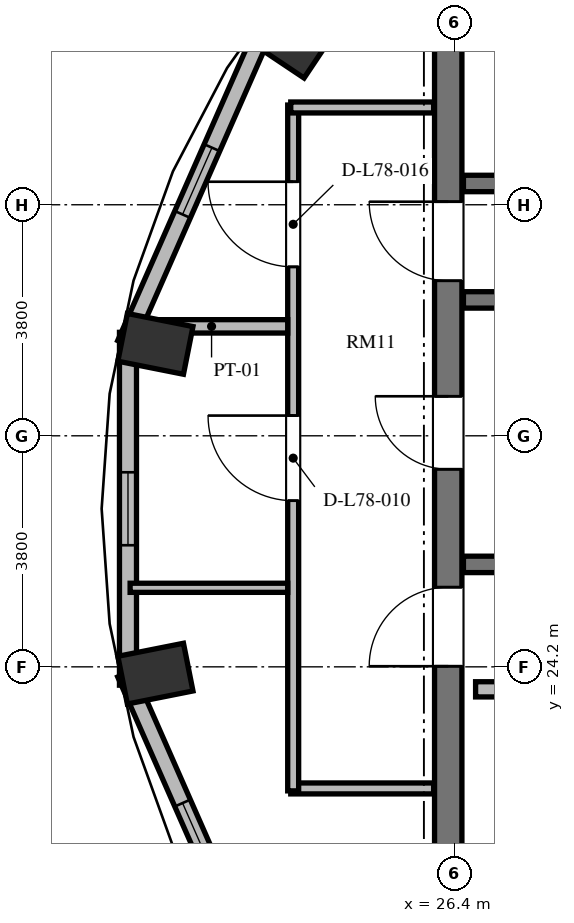
"""IFC4 building model, lengths in metres.
Left out: names, types, materials, properties, quantities, classifications, styles, units other than length and angle.
Written with IfcOpenShell. Run it as: python <this file> out.ifc"""

import sys

from ifc_helpers import new_model, si_unit, direction, frame, frame_2d, origin, origin_2d, place, context, subcontext, project, spatial, rectangle, extrude, element, fill, save


model = new_model("IFC4")
c1 = context("Model", 3, precision=1e-05, world=origin(), true_north=direction((0.0, 1.0)))
c2 = subcontext(c1, "Body", "Model", "MODEL_VIEW")
j1 = project(units=[si_unit("LENGTHUNIT", "METRE"), si_unit("PLANEANGLEUNIT", "RADIAN")], contexts=[c1])
p1 = place(None, origin())
s1 = spatial("IfcSite", under=j1, at=p1, CompositionType="ELEMENT")
p2 = place(p1, origin())
s2 = spatial("IfcBuilding", under=s1, at=p2, CompositionType="ELEMENT")
p3 = place(p2, frame((0.0, 0.0, 298.8)))
s3 = spatial("IfcBuildingStorey", under=s2, at=p3, CompositionType="ELEMENT", Elevation=298.8)
for number, where, z_axis, x_axis in (
    (1, (23.694, 34.522, 0.0), (0.0, 0.0, 1.0), (-0.831, 0.556, 0.0)),
    (2, (21.484, 29.512, 0.0), (0.0, 0.0, 1.0), (-0.981, 0.195, 0.0)),
    (3, (21.484, 24.088, 0.0), (0.0, 0.0, 1.0), (-0.981, -0.195, 0.0)),
):
    element("IfcColumn", number, at=place(p3, frame(where, z_axis=z_axis, x_axis=x_axis)), inside=s3, PredefinedType="COLUMN", context=c2, shape_type="SweptSolid", body=[
        extrude(rectangle(XDim=1.1, YDim=0.8, at=origin_2d()), origin(), (0.0, 0.0, 1.0), 3.648),
    ])
p4 = place(p3, frame((26.3, 20.95, 0.0), z_axis=(0.0, 0.0, 1.0), x_axis=(0.0, 1.0, 0.0)))
e4 = element("IfcWall", 4, at=p4, inside=s3, PredefinedType="SHEAR", context=c2, shape_type="SweptSolid", body=[
    extrude(rectangle(XDim=14.1, YDim=0.45, at=frame_2d((7.05, 0.0))), origin(), (0.0, 0.0, 1.0), 3.648),
])
p5 = place(p4, frame((6.5, 0.0, 0.0)))
e5 = element("IfcOpeningElement", 5, at=p5, cuts=e4, PredefinedType="OPENING", context=c2, shape_type="SweptSolid", body=[
    extrude(rectangle(XDim=1.2, YDim=2.15, at=frame_2d((0.6, 1.075))), frame((0.0, 0.235, 0.0), z_axis=(0.0, -1.0, 0.0), x_axis=(1.0, 0.0, 0.0)), (0.0, 0.0, 1.0), 0.47),
])
p6 = place(p4, frame((9.6, 0.0, 0.0)))
e6 = element("IfcOpeningElement", 6, at=p6, cuts=e4, PredefinedType="OPENING", context=c2, shape_type="SweptSolid", body=[
    extrude(rectangle(XDim=1.3, YDim=2.2, at=frame_2d((0.65, 1.1))), frame((0.0, 0.235, 0.0), z_axis=(0.0, -1.0, 0.0), x_axis=(1.0, 0.0, 0.0)), (0.0, 0.0, 1.0), 0.47),
])
p7 = place(p4, frame((3.26, 0.0, 0.0)))
e7 = element("IfcOpeningElement", 7, at=p7, cuts=e4, PredefinedType="OPENING", context=c2, shape_type="SweptSolid", body=[
    extrude(rectangle(XDim=1.3, YDim=2.2, at=frame_2d((0.65, 1.1))), frame((0.0, 0.235, 0.0), z_axis=(0.0, -1.0, 0.0), x_axis=(1.0, 0.0, 0.0)), (0.0, 0.0, 1.0), 0.47),
])
p8 = place(p3, frame((23.352, 34.869, 0.0), z_axis=(0.0, 0.0, 1.0), x_axis=(-0.402882523888, -0.915251698685, 0.0)))
e8 = element("IfcWall", 8, at=p8, inside=s3, PredefinedType="SOLIDWALL", context=c2, shape_type="SweptSolid", body=[
    extrude(rectangle(XDim=5.856, YDim=0.28, at=frame_2d((2.928, 0.0))), origin(), (0.0, 0.0, 1.0), 3.328),
])
p9 = place(p8, frame((2.328, 0.0, 0.85)))
e9 = element("IfcOpeningElement", 9, at=p9, cuts=e8, PredefinedType="OPENING", context=c2, shape_type="SweptSolid", body=[
    extrude(rectangle(XDim=1.2, YDim=1.8, at=frame_2d((0.6, 0.9))), frame((0.0, 0.15, 0.0), z_axis=(0.0, -1.0, 0.0), x_axis=(1.0, 0.0, 0.0)), (0.0, 0.0, 1.0), 0.3),
])
p10 = place(p3, frame((21.033, 29.701, 0.0), z_axis=(0.0, 0.0, 1.0), x_axis=(0.0, -1.0, 0.0)))
e10 = element("IfcWall", 10, at=p10, inside=s3, PredefinedType="SOLIDWALL", context=c2, shape_type="SweptSolid", body=[
    extrude(rectangle(XDim=5.803, YDim=0.28, at=frame_2d((2.901, 0.0))), origin(), (0.0, 0.0, 1.0), 3.328),
])
p11 = place(p10, frame((2.302, 0.0, 0.85)))
e11 = element("IfcOpeningElement", 11, at=p11, cuts=e10, PredefinedType="OPENING", context=c2, shape_type="SweptSolid", body=[
    extrude(rectangle(XDim=1.2, YDim=1.8, at=frame_2d((0.6, 0.9))), frame((0.0, 0.15, 0.0), z_axis=(0.0, -1.0, 0.0), x_axis=(1.0, 0.0, 0.0)), (0.0, 0.0, 1.0), 0.3),
])
p12 = place(p3, frame((20.993, 24.09, 0.0), z_axis=(0.0, 0.0, 1.0), x_axis=(0.402867150469, -0.91525846572, 0.0)))
e12 = element("IfcWall", 12, at=p12, inside=s3, PredefinedType="SOLIDWALL", context=c2, shape_type="SweptSolid", body=[
    extrude(rectangle(XDim=5.856, YDim=0.28, at=frame_2d((2.928, 0.0))), origin(), (0.0, 0.0, 1.0), 3.328),
])
p13 = place(p12, frame((2.328, 0.0, 0.85)))
e13 = element("IfcOpeningElement", 13, at=p13, cuts=e12, PredefinedType="OPENING", context=c2, shape_type="SweptSolid", body=[
    extrude(rectangle(XDim=1.2, YDim=1.8, at=frame_2d((0.6, 0.9))), frame((0.0, 0.15, 0.0), z_axis=(0.0, -1.0, 0.0), x_axis=(1.0, 0.0, 0.0)), (0.0, 0.0, 1.0), 0.3),
])
for number, where, z_axis, x_axis in (
    (14, (26.55, 30.235, 0.0), (0.0, 0.0, 1.0), (1.0, 0.0, 0.0)),
    (15, (26.55, 25.885, 0.0), (0.0, 0.0, 1.0), (1.0, 0.0, 0.0)),
):
    element("IfcWall", number, at=place(p3, frame(where, z_axis=z_axis, x_axis=x_axis)), inside=s3, PredefinedType="SHEAR", context=c2, shape_type="SweptSolid", body=[
        extrude(rectangle(XDim=7.985, YDim=0.27, at=frame_2d((3.992, 0.0))), origin(), (0.0, 0.0, 1.0), 3.648),
    ])
p14 = place(p3, frame((26.55, 32.15, 0.0), z_axis=(0.0, 0.0, 1.0), x_axis=(1.0, 0.0, 0.0)))
e16 = element("IfcWall", 16, at=p14, inside=s3, PredefinedType="SHEAR", context=c2, shape_type="SweptSolid", body=[
    extrude(rectangle(XDim=16.4, YDim=0.27, at=frame_2d((8.2, 0.0))), origin(), (0.0, 0.0, 1.0), 3.648),
])
p15 = place(p14, frame((2.175, 0.0, 0.0)))
e17 = element("IfcOpeningElement", 17, at=p15, cuts=e16, PredefinedType="OPENING", context=c2, shape_type="SweptSolid", body=[
    extrude(rectangle(XDim=1.05, YDim=2.15, at=frame_2d((0.525, 1.075))), frame((0.0, 0.145, 0.0), z_axis=(0.0, -1.0, 0.0), x_axis=(1.0, 0.0, 0.0)), (0.0, 0.0, 1.0), 0.29),
])
p16 = place(p14, frame((7.575, 0.0, 0.0)))
e18 = element("IfcOpeningElement", 18, at=p16, cuts=e16, PredefinedType="OPENING", context=c2, shape_type="SweptSolid", body=[
    extrude(rectangle(XDim=1.05, YDim=2.15, at=frame_2d((0.525, 1.075))), frame((0.0, 0.145, 0.0), z_axis=(0.0, -1.0, 0.0), x_axis=(1.0, 0.0, 0.0)), (0.0, 0.0, 1.0), 0.29),
])
p17 = place(p14, frame((11.9, 0.0, 0.0)))
e19 = element("IfcOpeningElement", 19, at=p17, cuts=e16, PredefinedType="OPENING", context=c2, shape_type="SweptSolid", body=[
    extrude(rectangle(XDim=1.1, YDim=2.2, at=frame_2d((0.55, 1.1))), frame((0.0, 0.145, 0.0), z_axis=(0.0, -1.0, 0.0), x_axis=(1.0, 0.0, 0.0)), (0.0, 0.0, 1.0), 0.29),
])
p18 = place(p14, frame((14.5, 0.0, 0.0)))
e20 = element("IfcOpeningElement", 20, at=p18, cuts=e16, PredefinedType="OPENING", context=c2, shape_type="SweptSolid", body=[
    extrude(rectangle(XDim=1.1, YDim=2.2, at=frame_2d((0.55, 1.1))), frame((0.0, 0.145, 0.0), z_axis=(0.0, -1.0, 0.0), x_axis=(1.0, 0.0, 0.0)), (0.0, 0.0, 1.0), 0.29),
])
p19 = place(p3, frame((26.75, 23.83, 0.0), z_axis=(0.0, 0.0, 1.0), x_axis=(1.0, 0.0, 0.0)))
e21 = element("IfcWall", 21, at=p19, inside=s3, PredefinedType="SOLIDWALL", context=c2, shape_type="SweptSolid", body=[
    extrude(rectangle(XDim=16.2, YDim=0.25, at=frame_2d((8.1, 0.0))), origin(), (0.0, 0.0, 1.0), 3.328),
])
p20 = place(p19, frame((4.75, 0.0, 0.0)))
e22 = element("IfcOpeningElement", 22, at=p20, cuts=e21, PredefinedType="OPENING", context=c2, shape_type="SweptSolid", body=[
    extrude(rectangle(XDim=1.4, YDim=2.2, at=frame_2d((0.7, 1.1))), frame((0.0, 0.135, 0.0), z_axis=(0.0, -1.0, 0.0), x_axis=(1.0, 0.0, 0.0)), (0.0, 0.0, 1.0), 0.27),
])
p21 = place(p19, frame((11.7, 0.0, 0.0)))
e23 = element("IfcOpeningElement", 23, at=p21, cuts=e21, PredefinedType="OPENING", context=c2, shape_type="SweptSolid", body=[
    extrude(rectangle(XDim=1.1, YDim=2.2, at=frame_2d((0.55, 1.1))), frame((0.0, 0.135, 0.0), z_axis=(0.0, -1.0, 0.0), x_axis=(1.0, 0.0, 0.0)), (0.0, 0.0, 1.0), 0.27),
])
p22 = place(p19, frame((14.15, 0.0, 0.0)))
e24 = element("IfcOpeningElement", 24, at=p22, cuts=e21, PredefinedType="OPENING", context=c2, shape_type="SweptSolid", body=[
    extrude(rectangle(XDim=1.4, YDim=2.3, at=frame_2d((0.7, 1.15))), frame((0.0, 0.135, 0.0), z_axis=(0.0, -1.0, 0.0), x_axis=(1.0, 0.0, 0.0)), (0.0, 0.0, 1.0), 0.27),
])
p23 = place(p3, frame((26.06, 22.2, 0.0), z_axis=(0.0, 0.0, 1.0), x_axis=(-1.0, 0.0, 0.0)))
e25 = element("IfcWall", 25, at=p23, inside=s3, PredefinedType="PARTITIONING", context=c2, shape_type="SweptSolid", body=[
    extrude(rectangle(XDim=2.35, YDim=0.18, at=frame_2d((1.175, 0.0))), origin(), (0.0, 0.0, 1.0), 3.328),
])
p24 = place(p3, frame((23.75, 22.16, 0.0), z_axis=(0.0, 0.0, 1.0), x_axis=(0.0, 1.0, 0.0)))
e26 = element("IfcWall", 26, at=p24, inside=s3, PredefinedType="PARTITIONING", context=c2, shape_type="SweptSolid", body=[
    extrude(rectangle(XDim=11.28, YDim=0.18, at=frame_2d((5.64, 0.0))), origin(), (0.0, 0.0, 1.0), 2.953),
])
p25 = place(p24, frame((4.772, 0.0, 0.0)))
e27 = element("IfcOpeningElement", 27, at=p25, cuts=e26, PredefinedType="OPENING", context=c2, shape_type="SweptSolid", body=[
    extrude(rectangle(XDim=1.4, YDim=2.2, at=frame_2d((0.7, 1.1))), frame((0.0, 0.1, 0.0), z_axis=(0.0, -1.0, 0.0), x_axis=(1.0, 0.0, 0.0)), (0.0, 0.0, 1.0), 0.2),
])
p26 = place(p24, frame((8.618, 0.0, 0.0)))
e28 = element("IfcOpeningElement", 28, at=p26, cuts=e26, PredefinedType="OPENING", context=c2, shape_type="SweptSolid", body=[
    extrude(rectangle(XDim=1.4, YDim=2.2, at=frame_2d((0.7, 1.1))), frame((0.0, 0.1, 0.0), z_axis=(0.0, -1.0, 0.0), x_axis=(1.0, 0.0, 0.0)), (0.0, 0.0, 1.0), 0.2),
])
p27 = place(p3, frame((23.71, 33.4, 0.0), z_axis=(0.0, 0.0, 1.0), x_axis=(1.0, 0.0, 0.0)))
e29 = element("IfcWall", 29, at=p27, inside=s3, PredefinedType="PARTITIONING", context=c2, shape_type="SweptSolid", body=[
    extrude(rectangle(XDim=2.35, YDim=0.18, at=frame_2d((1.175, 0.0))), origin(), (0.0, 0.0, 1.0), 3.328),
])
p28 = place(p3, frame((21.068, 25.5, 0.0), z_axis=(0.0, 0.0, 1.0), x_axis=(1.0, 0.0, 0.0)))
e30 = element("IfcWall", 30, at=p28, inside=s3, PredefinedType="PARTITIONING", context=c2, shape_type="SweptSolid", body=[
    extrude(rectangle(XDim=2.592, YDim=0.15, at=frame_2d((1.296, 0.0))), origin(), (0.0, 0.0, 1.0), 3.328),
])
p29 = place(p3, frame((21.156, 29.8, 0.0), z_axis=(0.0, 0.0, 1.0), x_axis=(1.0, 0.0, 0.0)))
e31 = element("IfcWall", 31, at=p29, inside=s3, PredefinedType="PARTITIONING", context=c2, shape_type="SweptSolid", body=[
    extrude(rectangle(XDim=2.504, YDim=0.22, at=frame_2d((1.252, 0.0))), origin(), (0.0, 0.0, 1.0), 3.328),
])
p30 = place(p9, origin())
e32 = element("IfcWindow", 32, at=p30, inside=s3, PartitioningType="SINGLE_PANEL", PredefinedType="WINDOW", context=c2, shape_type="SweptSolid", body=[
    extrude(rectangle(XDim=1.2, YDim=1.8, at=frame_2d((0.6, 0.9))), frame((0.0, 0.03, 0.0), z_axis=(0.0, -1.0, 0.0), x_axis=(1.0, 0.0, 0.0)), (0.0, 0.0, 1.0), 0.06),
])
fill(e9, e32)
p31 = place(p11, origin())
e33 = element("IfcWindow", 33, at=p31, inside=s3, PartitioningType="SINGLE_PANEL", PredefinedType="WINDOW", context=c2, shape_type="SweptSolid", body=[
    extrude(rectangle(XDim=1.2, YDim=1.8, at=frame_2d((0.6, 0.9))), frame((0.0, 0.03, 0.0), z_axis=(0.0, -1.0, 0.0), x_axis=(1.0, 0.0, 0.0)), (0.0, 0.0, 1.0), 0.06),
])
fill(e11, e33)
p32 = place(p13, origin())
e34 = element("IfcWindow", 34, at=p32, inside=s3, PartitioningType="SINGLE_PANEL", PredefinedType="WINDOW", context=c2, shape_type="SweptSolid", body=[
    extrude(rectangle(XDim=1.2, YDim=1.8, at=frame_2d((0.6, 0.9))), frame((0.0, 0.03, 0.0), z_axis=(0.0, -1.0, 0.0), x_axis=(1.0, 0.0, 0.0)), (0.0, 0.0, 1.0), 0.06),
])
fill(e13, e34)
p33 = place(p5, origin())
e35 = element("IfcDoor", 35, at=p33, inside=s3, OperationType="SINGLE_SWING_RIGHT", PredefinedType="DOOR", context=c2, shape_type="SweptSolid", body=[
    extrude(rectangle(XDim=1.2, YDim=2.15, at=frame_2d((0.6, 1.075))), frame((0.0, 0.025, 0.0), z_axis=(0.0, -1.0, 0.0), x_axis=(1.0, 0.0, 0.0)), (0.0, 0.0, 1.0), 0.05),
])
fill(e5, e35)
p34 = place(p6, origin())
e36 = element("IfcDoor", 36, at=p34, inside=s3, OperationType="SINGLE_SWING_RIGHT", PredefinedType="DOOR", context=c2, shape_type="SweptSolid", body=[
    extrude(rectangle(XDim=1.3, YDim=2.2, at=frame_2d((0.65, 1.1))), frame((0.0, 0.025, 0.0), z_axis=(0.0, -1.0, 0.0), x_axis=(1.0, 0.0, 0.0)), (0.0, 0.0, 1.0), 0.05),
])
fill(e6, e36)
p35 = place(p7, origin())
e37 = element("IfcDoor", 37, at=p35, inside=s3, OperationType="SINGLE_SWING_LEFT", PredefinedType="DOOR", context=c2, shape_type="SweptSolid", body=[
    extrude(rectangle(XDim=1.3, YDim=2.2, at=frame_2d((0.65, 1.1))), frame((0.0, 0.025, 0.0), z_axis=(0.0, -1.0, 0.0), x_axis=(1.0, 0.0, 0.0)), (0.0, 0.0, 1.0), 0.05),
])
fill(e7, e37)
p36 = place(p25, origin())
e38 = element("IfcDoor", 38, at=p36, inside=s3, OperationType="SINGLE_SWING_RIGHT", PredefinedType="DOOR", context=c2, shape_type="SweptSolid", body=[
    extrude(rectangle(XDim=1.4, YDim=2.2, at=frame_2d((0.7, 1.1))), frame((0.0, 0.025, 0.0), z_axis=(0.0, -1.0, 0.0), x_axis=(1.0, 0.0, 0.0)), (0.0, 0.0, 1.0), 0.05),
])
fill(e27, e38)
p37 = place(p26, origin())
e39 = element("IfcDoor", 39, at=p37, inside=s3, OperationType="SINGLE_SWING_RIGHT", PredefinedType="DOOR", context=c2, shape_type="SweptSolid", body=[
    extrude(rectangle(XDim=1.4, YDim=2.2, at=frame_2d((0.7, 1.1))), frame((0.0, 0.025, 0.0), z_axis=(0.0, -1.0, 0.0), x_axis=(1.0, 0.0, 0.0)), (0.0, 0.0, 1.0), 0.05),
])
fill(e28, e39)
save(model, sys.argv[1])
